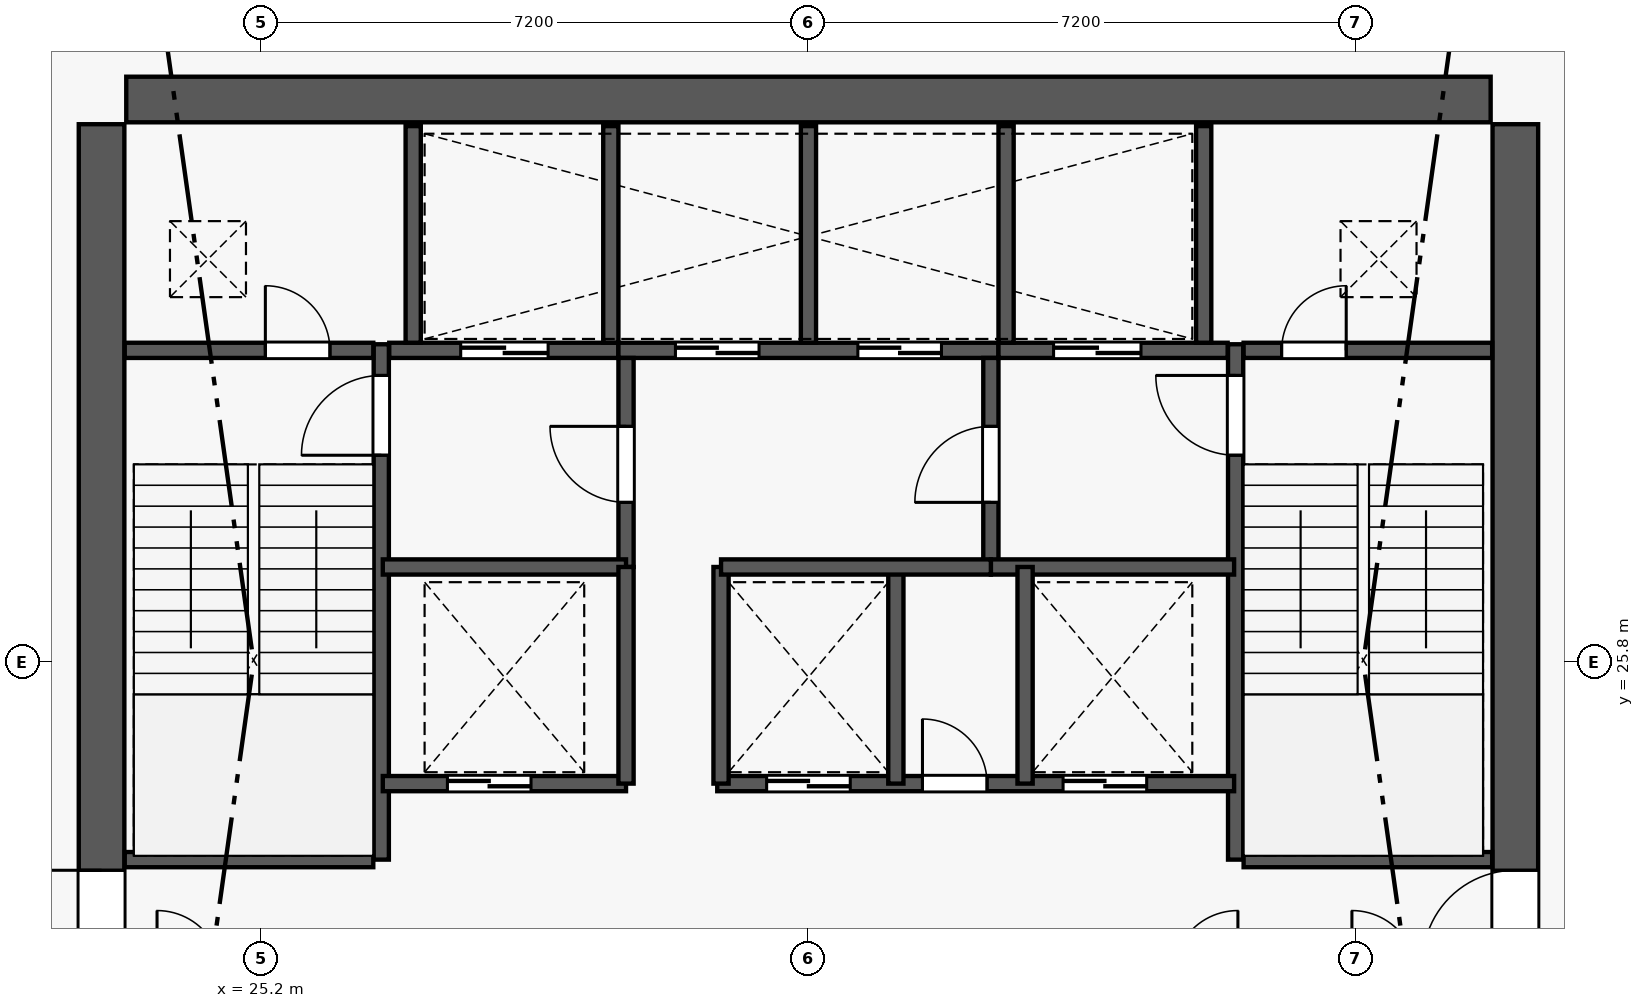
"""IFC4 building model, lengths in metres.
Left out: names, types, materials, properties, quantities, classifications, styles, units other than length and angle.
Written with IfcOpenShell. Run it as: python <this file> out.ifc"""

import sys

from ifc_helpers import new_model, si_unit, direction, frame, frame_2d, origin, origin_2d, place, context, subcontext, project, spatial, rectangle, extrude, element, fill, save


model = new_model("IFC4")
c1 = context("Model", 3, precision=1e-05, world=origin(), true_north=direction((0.0, 1.0)))
c2 = subcontext(c1, "Body", "Model", "MODEL_VIEW")
j1 = project(units=[si_unit("LENGTHUNIT", "METRE"), si_unit("PLANEANGLEUNIT", "RADIAN")], contexts=[c1])
p1 = place(None, origin())
s1 = spatial("IfcSite", under=j1, at=p1, CompositionType="ELEMENT")
p2 = place(p1, origin())
s2 = spatial("IfcBuilding", under=s1, at=p2, CompositionType="ELEMENT")
p3 = place(p2, frame((0.0, 0.0, 167.7)))
s3 = spatial("IfcBuildingStorey", under=s2, at=p3, CompositionType="ELEMENT", Elevation=167.7)
for number, where, z_axis, x_axis in (
    (1, (41.7, 33.2, 0.0), (0.0, 0.0, 1.0), (1.0, 0.0, 0.0)),
    (2, (23.1, 33.2, 0.0), (0.0, 0.0, 1.0), (1.0, 0.0, 0.0)),
):
    element("IfcColumn", number, at=place(p3, frame(where, z_axis=z_axis, x_axis=x_axis)), inside=s3, PredefinedType="COLUMN", context=c2, shape_type="SweptSolid", body=[
        extrude(rectangle(XDim=0.65, YDim=0.65, at=origin_2d()), origin(), (0.0, 0.0, 1.0), 4.2),
    ])
p4 = place(p3, frame((23.425, 33.2, 0.0), z_axis=(0.0, 0.0, 1.0), x_axis=(1.0, 0.0, 0.0)))
e3 = element("IfcWall", 3, at=p4, inside=s3, PredefinedType="SHEAR", context=c2, shape_type="SweptSolid", body=[
    extrude(rectangle(XDim=17.95, YDim=0.6, at=frame_2d((8.975, 0.0))), origin(), (0.0, 0.0, 1.0), 4.0),
])
p5 = place(p3, frame((23.1, 18.925, 0.0), z_axis=(0.0, 0.0, 1.0), x_axis=(0.0, 1.0, 0.0)))
e4 = element("IfcWall", 4, at=p5, inside=s3, PredefinedType="SHEAR", context=c2, shape_type="SweptSolid", body=[
    extrude(rectangle(XDim=13.95, YDim=0.6, at=frame_2d((6.975, 0.0))), origin(), (0.0, 0.0, 1.0), 4.0),
])
p6 = place(p5, frame((2.915, 0.0, 0.0)))
e5 = element("IfcOpeningElement", 5, at=p6, cuts=e4, PredefinedType="OPENING", context=c2, shape_type="SweptSolid", body=[
    extrude(rectangle(XDim=1.22, YDim=2.25, at=frame_2d((0.61, 1.125))), frame((0.0, 0.31, 0.0), z_axis=(0.0, -1.0, 0.0), x_axis=(1.0, 0.0, 0.0)), (0.0, 0.0, 1.0), 0.62),
])
p7 = place(p3, frame((41.7, 18.925, 0.0), z_axis=(0.0, 0.0, 1.0), x_axis=(0.0, 1.0, 0.0)))
e6 = element("IfcWall", 6, at=p7, inside=s3, PredefinedType="SHEAR", context=c2, shape_type="SweptSolid", body=[
    extrude(rectangle(XDim=13.95, YDim=0.6, at=frame_2d((6.975, 0.0))), origin(), (0.0, 0.0, 1.0), 4.0),
])
p8 = place(p7, frame((2.915, 0.0, 0.0)))
e7 = element("IfcOpeningElement", 7, at=p8, cuts=e6, PredefinedType="OPENING", context=c2, shape_type="SweptSolid", body=[
    extrude(rectangle(XDim=1.22, YDim=2.25, at=frame_2d((0.61, 1.125))), frame((0.0, 0.31, 0.0), z_axis=(0.0, -1.0, 0.0), x_axis=(1.0, 0.0, 0.0)), (0.0, 0.0, 1.0), 0.62),
])
p9 = place(p3, frame((26.78, 23.2, 0.0), z_axis=(0.0, 0.0, 1.0), x_axis=(0.0, 1.0, 0.0)))
e8 = element("IfcWall", 8, at=p9, inside=s3, PredefinedType="SHEAR", context=c2, shape_type="SweptSolid", body=[
    extrude(rectangle(XDim=6.78, YDim=0.2, at=frame_2d((3.39, 0.0))), origin(), (0.0, 0.0, 1.0), 4.2),
])
p10 = place(p9, frame((5.32, 0.0, 0.0)))
e9 = element("IfcOpeningElement", 9, at=p10, cuts=e8, PredefinedType="OPENING", context=c2, shape_type="SweptSolid", body=[
    extrude(rectangle(XDim=1.05, YDim=2.15, at=frame_2d((0.525, 1.075))), frame((0.0, 0.11, 0.0), z_axis=(0.0, -1.0, 0.0), x_axis=(1.0, 0.0, 0.0)), (0.0, 0.0, 1.0), 0.22),
])
p11 = place(p3, frame((23.405, 23.2, 0.0), z_axis=(0.0, 0.0, 1.0), x_axis=(1.0, 0.0, 0.0)))
e10 = element("IfcWall", 10, at=p11, inside=s3, PredefinedType="PLUMBINGWALL", context=c2, shape_type="SweptSolid", body=[
    extrude(rectangle(XDim=3.27, YDim=0.2, at=frame_2d((1.635, 0.0))), origin(), (0.0, 0.0, 1.0), 4.0),
])
p12 = place(p3, frame((38.02, 23.2, 0.0), z_axis=(0.0, 0.0, 1.0), x_axis=(0.0, 1.0, 0.0)))
e11 = element("IfcWall", 11, at=p12, inside=s3, PredefinedType="SHEAR", context=c2, shape_type="SweptSolid", body=[
    extrude(rectangle(XDim=6.78, YDim=0.2, at=frame_2d((3.39, 0.0))), origin(), (0.0, 0.0, 1.0), 4.2),
])
p13 = place(p12, frame((5.32, 0.0, 0.0)))
e12 = element("IfcOpeningElement", 12, at=p13, cuts=e11, PredefinedType="OPENING", context=c2, shape_type="SweptSolid", body=[
    extrude(rectangle(XDim=1.05, YDim=2.15, at=frame_2d((0.525, 1.075))), frame((0.0, 0.11, 0.0), z_axis=(0.0, -1.0, 0.0), x_axis=(1.0, 0.0, 0.0)), (0.0, 0.0, 1.0), 0.22),
])
p14 = place(p3, frame((38.125, 23.2, 0.0), z_axis=(0.0, 0.0, 1.0), x_axis=(1.0, 0.0, 0.0)))
e13 = element("IfcWall", 13, at=p14, inside=s3, PredefinedType="PLUMBINGWALL", context=c2, shape_type="SweptSolid", body=[
    extrude(rectangle(XDim=3.27, YDim=0.2, at=frame_2d((1.635, 0.0))), origin(), (0.0, 0.0, 1.0), 4.0),
])
p15 = place(p3, frame((23.405, 29.9, 0.0), z_axis=(0.0, 0.0, 1.0), x_axis=(1.0, 0.0, 0.0)))
e14 = element("IfcWall", 14, at=p15, inside=s3, PredefinedType="PLUMBINGWALL", context=c2, shape_type="SweptSolid", body=[
    extrude(rectangle(XDim=3.27, YDim=0.2, at=frame_2d((1.635, 0.0))), origin(), (0.0, 0.0, 1.0), 4.0),
])
p16 = place(p15, frame((1.85, 0.0, 0.0)))
e15 = element("IfcOpeningElement", 15, at=p16, cuts=e14, PredefinedType="OPENING", context=c2, shape_type="SweptSolid", body=[
    extrude(rectangle(XDim=0.85, YDim=2.05, at=frame_2d((0.425, 1.025))), frame((0.0, 0.11, 0.0), z_axis=(0.0, -1.0, 0.0), x_axis=(1.0, 0.0, 0.0)), (0.0, 0.0, 1.0), 0.22),
])
p17 = place(p3, frame((26.885, 29.9, 0.0), z_axis=(0.0, 0.0, 1.0), x_axis=(1.0, 0.0, 0.0)))
e16 = element("IfcWall", 16, at=p17, inside=s3, PredefinedType="PLUMBINGWALL", context=c2, shape_type="SweptSolid", body=[
    extrude(rectangle(XDim=3.015, YDim=0.2, at=frame_2d((1.507, 0.0))), origin(), (0.0, 0.0, 1.0), 4.0),
])
p18 = place(p17, frame((0.94, 0.0, 0.0)))
e17 = element("IfcOpeningElement", 17, at=p18, cuts=e16, PredefinedType="OPENING", context=c2, shape_type="SweptSolid", body=[
    extrude(rectangle(XDim=1.15, YDim=2.2, at=frame_2d((0.575, 1.1))), frame((0.0, 0.11, 0.0), z_axis=(0.0, -1.0, 0.0), x_axis=(1.0, 0.0, 0.0)), (0.0, 0.0, 1.0), 0.22),
])
p19 = place(p3, frame((29.9, 29.9, 0.0), z_axis=(0.0, 0.0, 1.0), x_axis=(1.0, 0.0, 0.0)))
e18 = element("IfcWall", 18, at=p19, inside=s3, PredefinedType="PLUMBINGWALL", context=c2, shape_type="SweptSolid", body=[
    extrude(rectangle(XDim=5.0, YDim=0.2, at=frame_2d((2.5, 0.0))), origin(), (0.0, 0.0, 1.0), 4.0),
])
p20 = place(p19, frame((0.75, 0.0, 0.0)))
e19 = element("IfcOpeningElement", 19, at=p20, cuts=e18, PredefinedType="OPENING", context=c2, shape_type="SweptSolid", body=[
    extrude(rectangle(XDim=1.1, YDim=2.2, at=frame_2d((0.55, 1.1))), frame((0.0, 0.11, 0.0), z_axis=(0.0, -1.0, 0.0), x_axis=(1.0, 0.0, 0.0)), (0.0, 0.0, 1.0), 0.22),
])
p21 = place(p19, frame((3.15, 0.0, 0.0)))
e20 = element("IfcOpeningElement", 20, at=p21, cuts=e18, PredefinedType="OPENING", context=c2, shape_type="SweptSolid", body=[
    extrude(rectangle(XDim=1.1, YDim=2.2, at=frame_2d((0.55, 1.1))), frame((0.0, 0.11, 0.0), z_axis=(0.0, -1.0, 0.0), x_axis=(1.0, 0.0, 0.0)), (0.0, 0.0, 1.0), 0.22),
])
p22 = place(p3, frame((34.9, 29.9, 0.0), z_axis=(0.0, 0.0, 1.0), x_axis=(1.0, 0.0, 0.0)))
e21 = element("IfcWall", 21, at=p22, inside=s3, PredefinedType="PLUMBINGWALL", context=c2, shape_type="SweptSolid", body=[
    extrude(rectangle(XDim=3.015, YDim=0.2, at=frame_2d((1.508, 0.0))), origin(), (0.0, 0.0, 1.0), 4.0),
])
p23 = place(p22, frame((0.725, 0.0, 0.0)))
e22 = element("IfcOpeningElement", 22, at=p23, cuts=e21, PredefinedType="OPENING", context=c2, shape_type="SweptSolid", body=[
    extrude(rectangle(XDim=1.15, YDim=2.2, at=frame_2d((0.575, 1.1))), frame((0.0, 0.11, 0.0), z_axis=(0.0, -1.0, 0.0), x_axis=(1.0, 0.0, 0.0)), (0.0, 0.0, 1.0), 0.22),
])
p24 = place(p3, frame((38.125, 29.9, 0.0), z_axis=(0.0, 0.0, 1.0), x_axis=(1.0, 0.0, 0.0)))
e23 = element("IfcWall", 23, at=p24, inside=s3, PredefinedType="PLUMBINGWALL", context=c2, shape_type="SweptSolid", body=[
    extrude(rectangle(XDim=3.27, YDim=0.2, at=frame_2d((1.635, 0.0))), origin(), (0.0, 0.0, 1.0), 4.0),
])
p25 = place(p24, frame((0.5, 0.0, 0.0)))
e24 = element("IfcOpeningElement", 24, at=p25, cuts=e23, PredefinedType="OPENING", context=c2, shape_type="SweptSolid", body=[
    extrude(rectangle(XDim=0.85, YDim=2.05, at=frame_2d((0.425, 1.025))), frame((0.0, 0.11, 0.0), z_axis=(0.0, -1.0, 0.0), x_axis=(1.0, 0.0, 0.0)), (0.0, 0.0, 1.0), 0.22),
])
for number, where, z_axis, x_axis in (
    (25, (27.2, 30.0, 0.0), (0.0, 0.0, 1.0), (0.0, 1.0, 0.0)),
    (26, (29.8, 30.0, 0.0), (0.0, 0.0, 1.0), (0.0, 1.0, 0.0)),
    (27, (32.4, 30.0, 0.0), (0.0, 0.0, 1.0), (0.0, 1.0, 0.0)),
    (28, (35.0, 30.0, 0.0), (0.0, 0.0, 1.0), (0.0, 1.0, 0.0)),
    (29, (37.6, 30.0, 0.0), (0.0, 0.0, 1.0), (0.0, 1.0, 0.0)),
):
    element("IfcWall", number, at=place(p3, frame(where, z_axis=z_axis, x_axis=x_axis)), inside=s3, PredefinedType="PLUMBINGWALL", context=c2, shape_type="SweptSolid", body=[
        extrude(rectangle(XDim=2.85, YDim=0.2, at=frame_2d((1.425, 0.0))), origin(), (0.0, 0.0, 1.0), 4.0),
    ])
p26 = place(p3, frame((30.0, 27.05, 0.0), z_axis=(0.0, 0.0, 1.0), x_axis=(0.0, 1.0, 0.0)))
e30 = element("IfcWall", 30, at=p26, inside=s3, PredefinedType="PLUMBINGWALL", context=c2, shape_type="SweptSolid", body=[
    extrude(rectangle(XDim=2.75, YDim=0.2, at=frame_2d((1.375, 0.0))), origin(), (0.0, 0.0, 1.0), 4.0),
])
p27 = place(p26, frame((0.85, 0.0, 0.0)))
e31 = element("IfcOpeningElement", 31, at=p27, cuts=e30, PredefinedType="OPENING", context=c2, shape_type="SweptSolid", body=[
    extrude(rectangle(XDim=1.0, YDim=2.15, at=frame_2d((0.5, 1.075))), frame((0.0, 0.11, 0.0), z_axis=(0.0, -1.0, 0.0), x_axis=(1.0, 0.0, 0.0)), (0.0, 0.0, 1.0), 0.22),
])
p28 = place(p3, frame((26.8, 27.05, 0.0), z_axis=(0.0, 0.0, 1.0), x_axis=(1.0, 0.0, 0.0)))
e32 = element("IfcWall", 32, at=p28, inside=s3, PredefinedType="PLUMBINGWALL", context=c2, shape_type="SweptSolid", body=[
    extrude(rectangle(XDim=3.2, YDim=0.2, at=frame_2d((1.6, 0.0))), origin(), (0.0, 0.0, 1.0), 4.0),
])
p29 = place(p3, frame((34.8, 27.05, 0.0), z_axis=(0.0, 0.0, 1.0), x_axis=(0.0, 1.0, 0.0)))
e33 = element("IfcWall", 33, at=p29, inside=s3, PredefinedType="PLUMBINGWALL", context=c2, shape_type="SweptSolid", body=[
    extrude(rectangle(XDim=2.75, YDim=0.2, at=frame_2d((1.375, 0.0))), origin(), (0.0, 0.0, 1.0), 4.0),
])
p30 = place(p29, frame((0.85, 0.0, 0.0)))
e34 = element("IfcOpeningElement", 34, at=p30, cuts=e33, PredefinedType="OPENING", context=c2, shape_type="SweptSolid", body=[
    extrude(rectangle(XDim=1.0, YDim=2.15, at=frame_2d((0.5, 1.075))), frame((0.0, 0.11, 0.0), z_axis=(0.0, -1.0, 0.0), x_axis=(1.0, 0.0, 0.0)), (0.0, 0.0, 1.0), 0.22),
])
p31 = place(p3, frame((34.8, 27.05, 0.0), z_axis=(0.0, 0.0, 1.0), x_axis=(1.0, 0.0, 0.0)))
e35 = element("IfcWall", 35, at=p31, inside=s3, PredefinedType="PLUMBINGWALL", context=c2, shape_type="SweptSolid", body=[
    extrude(rectangle(XDim=3.2, YDim=0.2, at=frame_2d((1.6, 0.0))), origin(), (0.0, 0.0, 1.0), 4.0),
])
p32 = place(p3, frame((26.8, 24.2, 0.0), z_axis=(0.0, 0.0, 1.0), x_axis=(1.0, 0.0, 0.0)))
e36 = element("IfcWall", 36, at=p32, inside=s3, PredefinedType="PLUMBINGWALL", context=c2, shape_type="SweptSolid", body=[
    extrude(rectangle(XDim=3.2, YDim=0.2, at=frame_2d((1.6, 0.0))), origin(), (0.0, 0.0, 1.0), 4.0),
])
p33 = place(p32, frame((0.85, 0.0, 0.0)))
e37 = element("IfcOpeningElement", 37, at=p33, cuts=e36, PredefinedType="OPENING", context=c2, shape_type="SweptSolid", body=[
    extrude(rectangle(XDim=1.1, YDim=2.2, at=frame_2d((0.55, 1.1))), frame((0.0, 0.11, 0.0), z_axis=(0.0, -1.0, 0.0), x_axis=(1.0, 0.0, 0.0)), (0.0, 0.0, 1.0), 0.22),
])
p34 = place(p3, frame((30.0, 24.2, 0.0), z_axis=(0.0, 0.0, 1.0), x_axis=(0.0, 1.0, 0.0)))
e38 = element("IfcWall", 38, at=p34, inside=s3, PredefinedType="PLUMBINGWALL", context=c2, shape_type="SweptSolid", body=[
    extrude(rectangle(XDim=2.85, YDim=0.2, at=frame_2d((1.425, 0.0))), origin(), (0.0, 0.0, 1.0), 4.0),
])
p35 = place(p3, frame((31.2, 24.2, 0.0), z_axis=(0.0, 0.0, 1.0), x_axis=(1.0, 0.0, 0.0)))
e39 = element("IfcWall", 39, at=p35, inside=s3, PredefinedType="PLUMBINGWALL", context=c2, shape_type="SweptSolid", body=[
    extrude(rectangle(XDim=6.8, YDim=0.2, at=frame_2d((3.4, 0.0))), origin(), (0.0, 0.0, 1.0), 4.0),
])
p36 = place(p35, frame((0.65, 0.0, 0.0)))
e40 = element("IfcOpeningElement", 40, at=p36, cuts=e39, PredefinedType="OPENING", context=c2, shape_type="SweptSolid", body=[
    extrude(rectangle(XDim=1.1, YDim=2.2, at=frame_2d((0.55, 1.1))), frame((0.0, 0.11, 0.0), z_axis=(0.0, -1.0, 0.0), x_axis=(1.0, 0.0, 0.0)), (0.0, 0.0, 1.0), 0.22),
])
p37 = place(p35, frame((2.7, 0.0, 0.0)))
e41 = element("IfcOpeningElement", 41, at=p37, cuts=e39, PredefinedType="OPENING", context=c2, shape_type="SweptSolid", body=[
    extrude(rectangle(XDim=0.85, YDim=2.05, at=frame_2d((0.425, 1.025))), frame((0.0, 0.11, 0.0), z_axis=(0.0, -1.0, 0.0), x_axis=(1.0, 0.0, 0.0)), (0.0, 0.0, 1.0), 0.22),
])
p38 = place(p35, frame((4.55, 0.0, 0.0)))
e42 = element("IfcOpeningElement", 42, at=p38, cuts=e39, PredefinedType="OPENING", context=c2, shape_type="SweptSolid", body=[
    extrude(rectangle(XDim=1.1, YDim=2.2, at=frame_2d((0.55, 1.1))), frame((0.0, 0.11, 0.0), z_axis=(0.0, -1.0, 0.0), x_axis=(1.0, 0.0, 0.0)), (0.0, 0.0, 1.0), 0.22),
])
for number, where, z_axis, x_axis in (
    (43, (31.25, 24.2, 0.0), (0.0, 0.0, 1.0), (0.0, 1.0, 0.0)),
    (44, (33.55, 24.2, 0.0), (0.0, 0.0, 1.0), (0.0, 1.0, 0.0)),
    (45, (35.25, 24.2, 0.0), (0.0, 0.0, 1.0), (0.0, 1.0, 0.0)),
):
    element("IfcWall", number, at=place(p3, frame(where, z_axis=z_axis, x_axis=x_axis)), inside=s3, PredefinedType="PLUMBINGWALL", context=c2, shape_type="SweptSolid", body=[
        extrude(rectangle(XDim=2.85, YDim=0.2, at=frame_2d((1.425, 0.0))), origin(), (0.0, 0.0, 1.0), 4.0),
    ])
p39 = place(p3, frame((31.25, 27.05, 0.0), z_axis=(0.0, 0.0, 1.0), x_axis=(1.0, 0.0, 0.0)))
e46 = element("IfcWall", 46, at=p39, inside=s3, PredefinedType="PLUMBINGWALL", context=c2, shape_type="SweptSolid", body=[
    extrude(rectangle(XDim=3.55, YDim=0.2, at=frame_2d((1.775, 0.0))), origin(), (0.0, 0.0, 1.0), 4.0),
])
p40 = place(p6, origin())
e47 = element("IfcDoor", 47, at=p40, inside=s3, OperationType="SINGLE_SWING_RIGHT", PredefinedType="DOOR", context=c2, shape_type="SweptSolid", body=[
    extrude(rectangle(XDim=1.22, YDim=2.25, at=frame_2d((0.61, 1.125))), frame((0.0, 0.025, 0.0), z_axis=(0.0, -1.0, 0.0), x_axis=(1.0, 0.0, 0.0)), (0.0, 0.0, 1.0), 0.05),
])
fill(e5, e47)
p41 = place(p8, origin())
e48 = element("IfcDoor", 48, at=p41, inside=s3, OperationType="SINGLE_SWING_LEFT", PredefinedType="DOOR", context=c2, shape_type="SweptSolid", body=[
    extrude(rectangle(XDim=1.22, YDim=2.25, at=frame_2d((0.61, 1.125))), frame((0.0, 0.025, 0.0), z_axis=(0.0, -1.0, 0.0), x_axis=(1.0, 0.0, 0.0)), (0.0, 0.0, 1.0), 0.05),
])
fill(e7, e48)
p42 = place(p10, origin())
e49 = element("IfcDoor", 49, at=p42, inside=s3, OperationType="SINGLE_SWING_LEFT", PredefinedType="DOOR", context=c2, shape_type="SweptSolid", body=[
    extrude(rectangle(XDim=1.05, YDim=2.15, at=frame_2d((0.525, 1.075))), frame((0.0, 0.025, 0.0), z_axis=(0.0, -1.0, 0.0), x_axis=(1.0, 0.0, 0.0)), (0.0, 0.0, 1.0), 0.05),
])
fill(e9, e49)
p43 = place(p13, origin())
e50 = element("IfcDoor", 50, at=p43, inside=s3, OperationType="SINGLE_SWING_RIGHT", PredefinedType="DOOR", context=c2, shape_type="SweptSolid", body=[
    extrude(rectangle(XDim=1.05, YDim=2.15, at=frame_2d((0.525, 1.075))), frame((0.0, 0.025, 0.0), z_axis=(0.0, -1.0, 0.0), x_axis=(1.0, 0.0, 0.0)), (0.0, 0.0, 1.0), 0.05),
])
fill(e12, e50)
p44 = place(p16, origin())
e51 = element("IfcDoor", 51, at=p44, inside=s3, OperationType="SINGLE_SWING_LEFT", PredefinedType="DOOR", context=c2, shape_type="SweptSolid", body=[
    extrude(rectangle(XDim=0.85, YDim=2.05, at=frame_2d((0.425, 1.025))), frame((0.0, 0.025, 0.0), z_axis=(0.0, -1.0, 0.0), x_axis=(1.0, 0.0, 0.0)), (0.0, 0.0, 1.0), 0.05),
])
fill(e15, e51)
p45 = place(p25, origin())
e52 = element("IfcDoor", 52, at=p45, inside=s3, OperationType="SINGLE_SWING_RIGHT", PredefinedType="DOOR", context=c2, shape_type="SweptSolid", body=[
    extrude(rectangle(XDim=0.85, YDim=2.05, at=frame_2d((0.425, 1.025))), frame((0.0, 0.025, 0.0), z_axis=(0.0, -1.0, 0.0), x_axis=(1.0, 0.0, 0.0)), (0.0, 0.0, 1.0), 0.05),
])
fill(e24, e52)
p46 = place(p18, origin())
e53 = element("IfcDoor", 53, at=p46, inside=s3, OperationType="DOUBLE_DOOR_SLIDING", PredefinedType="DOOR", context=c2, shape_type="SweptSolid", body=[
    extrude(rectangle(XDim=1.15, YDim=2.2, at=frame_2d((0.575, 1.1))), frame((0.0, 0.025, 0.0), z_axis=(0.0, -1.0, 0.0), x_axis=(1.0, 0.0, 0.0)), (0.0, 0.0, 1.0), 0.05),
])
fill(e17, e53)
p47 = place(p23, origin())
e54 = element("IfcDoor", 54, at=p47, inside=s3, OperationType="DOUBLE_DOOR_SLIDING", PredefinedType="DOOR", context=c2, shape_type="SweptSolid", body=[
    extrude(rectangle(XDim=1.15, YDim=2.2, at=frame_2d((0.575, 1.1))), frame((0.0, 0.025, 0.0), z_axis=(0.0, -1.0, 0.0), x_axis=(1.0, 0.0, 0.0)), (0.0, 0.0, 1.0), 0.05),
])
fill(e22, e54)
p48 = place(p20, origin())
e55 = element("IfcDoor", 55, at=p48, inside=s3, OperationType="DOUBLE_DOOR_SLIDING", PredefinedType="DOOR", context=c2, shape_type="SweptSolid", body=[
    extrude(rectangle(XDim=1.1, YDim=2.2, at=frame_2d((0.55, 1.1))), frame((0.0, 0.025, 0.0), z_axis=(0.0, -1.0, 0.0), x_axis=(1.0, 0.0, 0.0)), (0.0, 0.0, 1.0), 0.05),
])
fill(e19, e55)
p49 = place(p21, origin())
e56 = element("IfcDoor", 56, at=p49, inside=s3, OperationType="DOUBLE_DOOR_SLIDING", PredefinedType="DOOR", context=c2, shape_type="SweptSolid", body=[
    extrude(rectangle(XDim=1.1, YDim=2.2, at=frame_2d((0.55, 1.1))), frame((0.0, 0.025, 0.0), z_axis=(0.0, -1.0, 0.0), x_axis=(1.0, 0.0, 0.0)), (0.0, 0.0, 1.0), 0.05),
])
fill(e20, e56)
p50 = place(p27, origin())
e57 = element("IfcDoor", 57, at=p50, inside=s3, OperationType="SINGLE_SWING_RIGHT", PredefinedType="DOOR", context=c2, shape_type="SweptSolid", body=[
    extrude(rectangle(XDim=1.0, YDim=2.15, at=frame_2d((0.5, 1.075))), frame((0.0, 0.025, 0.0), z_axis=(0.0, -1.0, 0.0), x_axis=(1.0, 0.0, 0.0)), (0.0, 0.0, 1.0), 0.05),
])
fill(e31, e57)
p51 = place(p30, origin())
e58 = element("IfcDoor", 58, at=p51, inside=s3, OperationType="SINGLE_SWING_LEFT", PredefinedType="DOOR", context=c2, shape_type="SweptSolid", body=[
    extrude(rectangle(XDim=1.0, YDim=2.15, at=frame_2d((0.5, 1.075))), frame((0.0, 0.025, 0.0), z_axis=(0.0, -1.0, 0.0), x_axis=(1.0, 0.0, 0.0)), (0.0, 0.0, 1.0), 0.05),
])
fill(e34, e58)
p52 = place(p33, origin())
e59 = element("IfcDoor", 59, at=p52, inside=s3, OperationType="DOUBLE_DOOR_SLIDING", PredefinedType="DOOR", context=c2, shape_type="SweptSolid", body=[
    extrude(rectangle(XDim=1.1, YDim=2.2, at=frame_2d((0.55, 1.1))), frame((0.0, 0.025, 0.0), z_axis=(0.0, -1.0, 0.0), x_axis=(1.0, 0.0, 0.0)), (0.0, 0.0, 1.0), 0.05),
])
fill(e37, e59)
p53 = place(p36, origin())
e60 = element("IfcDoor", 60, at=p53, inside=s3, OperationType="DOUBLE_DOOR_SLIDING", PredefinedType="DOOR", context=c2, shape_type="SweptSolid", body=[
    extrude(rectangle(XDim=1.1, YDim=2.2, at=frame_2d((0.55, 1.1))), frame((0.0, 0.025, 0.0), z_axis=(0.0, -1.0, 0.0), x_axis=(1.0, 0.0, 0.0)), (0.0, 0.0, 1.0), 0.05),
])
fill(e40, e60)
p54 = place(p37, origin())
e61 = element("IfcDoor", 61, at=p54, inside=s3, OperationType="SINGLE_SWING_LEFT", PredefinedType="DOOR", context=c2, shape_type="SweptSolid", body=[
    extrude(rectangle(XDim=0.85, YDim=2.05, at=frame_2d((0.425, 1.025))), frame((0.0, 0.025, 0.0), z_axis=(0.0, -1.0, 0.0), x_axis=(1.0, 0.0, 0.0)), (0.0, 0.0, 1.0), 0.05),
])
fill(e41, e61)
p55 = place(p38, origin())
e62 = element("IfcDoor", 62, at=p55, inside=s3, OperationType="DOUBLE_DOOR_SLIDING", PredefinedType="DOOR", context=c2, shape_type="SweptSolid", body=[
    extrude(rectangle(XDim=1.1, YDim=2.2, at=frame_2d((0.55, 1.1))), frame((0.0, 0.025, 0.0), z_axis=(0.0, -1.0, 0.0), x_axis=(1.0, 0.0, 0.0)), (0.0, 0.0, 1.0), 0.05),
])
fill(e42, e62)
save(model, sys.argv[1])
